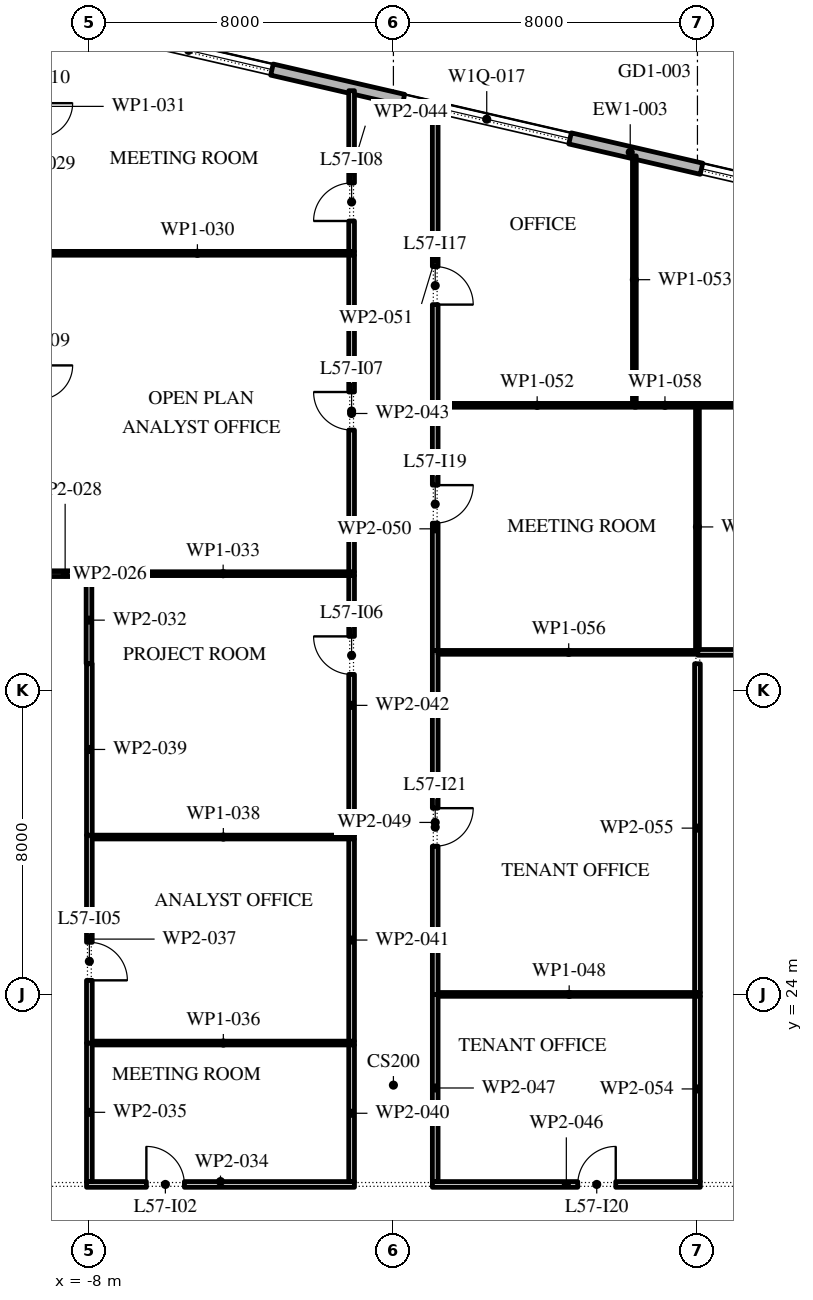
"""IFC4 building model, lengths in metres.
Left out: names, types, materials, properties, quantities, classifications, styles, units other than length and angle.
Written with IfcOpenShell. Run it as: python <this file> out.ifc"""

import sys

from ifc_helpers import new_model, si_unit, direction, frame, frame_2d, origin, place, context, subcontext, project, spatial, rectangle, extrude, element, fill, save


model = new_model("IFC4")
c1 = context("Model", 3, precision=1e-05, world=origin(), true_north=direction((0.0, 1.0)))
c2 = subcontext(c1, "Body", "Model", "MODEL_VIEW")
j1 = project(units=[si_unit("LENGTHUNIT", "METRE"), si_unit("PLANEANGLEUNIT", "RADIAN")], contexts=[c1])
p1 = place(None, origin())
s1 = spatial("IfcSite", under=j1, at=p1, CompositionType="ELEMENT")
p2 = place(p1, origin())
s2 = spatial("IfcBuilding", under=s1, at=p2, CompositionType="ELEMENT")
p3 = place(p2, frame((0.0, 0.0, 264.0)))
s3 = spatial("IfcBuildingStorey", under=s2, at=p3, CompositionType="ELEMENT", Elevation=264.0)
p4 = place(p3, frame((29.616, 40.758, 0.0), z_axis=(0.0, 0.0, 1.0), x_axis=(-0.974370532314, 0.224949029246, 0.0)))
e1 = element("IfcWall", 1, at=p4, inside=s3, PredefinedType="STANDARD", context=c2, shape_type="SweptSolid", body=[
    extrude(rectangle(XDim=48.0, YDim=0.3, at=frame_2d((24.0, 0.0))), origin(), (0.0, 0.0, 1.0), 4.0),
])
p5 = place(p4, frame((1.625, 0.0, 0.45)))
e2 = element("IfcOpeningElement", 2, at=p5, cuts=e1, PredefinedType="OPENING", context=c2, shape_type="SweptSolid", body=[
    extrude(rectangle(XDim=4.5, YDim=2.575, at=frame_2d((2.25, 1.288))), frame((0.0, 0.16, 0.0), z_axis=(0.0, -1.0, 0.0), x_axis=(1.0, 0.0, 0.0)), (0.0, 0.0, 1.0), 0.32),
])
p6 = place(p4, frame((10.575, 0.0, 0.0)))
e3 = element("IfcOpeningElement", 3, at=p6, cuts=e1, PredefinedType="OPENING", context=c2, shape_type="SweptSolid", body=[
    extrude(rectangle(XDim=2.4, YDim=3.5, at=frame_2d((1.2, 1.75))), frame((0.0, 0.16, 0.0), z_axis=(0.0, -1.0, 0.0), x_axis=(1.0, 0.0, 0.0)), (0.0, 0.0, 1.0), 0.32),
])
p7 = place(p4, frame((17.575, 0.0, 0.45)))
e4 = element("IfcOpeningElement", 4, at=p7, cuts=e1, PredefinedType="OPENING", context=c2, shape_type="SweptSolid", body=[
    extrude(rectangle(XDim=4.5, YDim=2.45, at=frame_2d((2.25, 1.225))), frame((0.0, 0.16, 0.0), z_axis=(0.0, -1.0, 0.0), x_axis=(1.0, 0.0, 0.0)), (0.0, 0.0, 1.0), 0.32),
])
p8 = place(p4, frame((25.625, 0.0, 0.45)))
e5 = element("IfcOpeningElement", 5, at=p8, cuts=e1, PredefinedType="OPENING", context=c2, shape_type="SweptSolid", body=[
    extrude(rectangle(XDim=4.5, YDim=2.45, at=frame_2d((2.25, 1.225))), frame((0.0, 0.16, 0.0), z_axis=(0.0, -1.0, 0.0), x_axis=(1.0, 0.0, 0.0)), (0.0, 0.0, 1.0), 0.32),
])
p9 = place(p4, frame((33.675, 0.0, 0.45)))
e6 = element("IfcOpeningElement", 6, at=p9, cuts=e1, PredefinedType="OPENING", context=c2, shape_type="SweptSolid", body=[
    extrude(rectangle(XDim=4.5, YDim=2.45, at=frame_2d((2.25, 1.225))), frame((0.0, 0.16, 0.0), z_axis=(0.0, -1.0, 0.0), x_axis=(1.0, 0.0, 0.0)), (0.0, 0.0, 1.0), 0.32),
])
p10 = place(p4, frame((42.775, 0.0, 0.0)))
e7 = element("IfcOpeningElement", 7, at=p10, cuts=e1, PredefinedType="OPENING", context=c2, shape_type="SweptSolid", body=[
    extrude(rectangle(XDim=2.4, YDim=3.5, at=frame_2d((1.2, 1.75))), frame((0.0, 0.16, 0.0), z_axis=(0.0, -1.0, 0.0), x_axis=(1.0, 0.0, 0.0)), (0.0, 0.0, 1.0), 0.32),
])
p11 = place(p3, frame((-9.34, 35.07, 0.0), z_axis=(0.0, 0.0, 1.0), x_axis=(1.0, 0.0, 0.0)))
e8 = element("IfcWall", 8, at=p11, inside=s3, PredefinedType="PARTITIONING", context=c2, shape_type="SweptSolid", body=[
    extrude(rectangle(XDim=1.405, YDim=0.15, at=frame_2d((0.703, 0.0))), origin(), (0.0, 0.0, 1.0), 4.0),
])
p12 = place(p3, frame((-9.29, 43.5, 0.0), z_axis=(0.0, 0.0, 1.0), x_axis=(1.0, 0.0, 0.0)))
e9 = element("IfcWall", 9, at=p12, inside=s3, PredefinedType="PARTITIONING", context=c2, shape_type="SweptSolid", body=[
    extrude(rectangle(XDim=8.265, YDim=0.1, at=frame_2d((4.133, 0.0))), origin(), (0.0, 0.0, 1.0), 4.0),
])
p13 = place(p3, frame((-8.01, 34.995, 0.0), z_axis=(0.0, 0.0, 1.0), x_axis=(0.0, -1.0, 0.0)))
e10 = element("IfcWall", 10, at=p13, inside=s3, PredefinedType="PARTITIONING", context=c2, shape_type="SweptSolid", body=[
    extrude(rectangle(XDim=2.295, YDim=0.15, at=frame_2d((1.147, 0.0))), origin(), (0.0, 0.0, 1.0), 4.0),
])
p14 = place(p3, frame((-7.935, 35.07, 0.0), z_axis=(0.0, 0.0, 1.0), x_axis=(1.0, 0.0, 0.0)))
e11 = element("IfcWall", 11, at=p14, inside=s3, PredefinedType="PARTITIONING", context=c2, shape_type="SweptSolid", body=[
    extrude(rectangle(XDim=6.91, YDim=0.1, at=frame_2d((3.455, 0.0))), origin(), (0.0, 0.0, 1.0), 4.0),
])
p15 = place(p3, frame((-8.075, 19.0, 0.0), z_axis=(0.0, 0.0, 1.0), x_axis=(1.0, 0.0, 0.0)))
e12 = element("IfcWall", 12, at=p15, inside=s3, PredefinedType="PARTITIONING", context=c2, shape_type="SweptSolid", body=[
    extrude(rectangle(XDim=7.05, YDim=0.15, at=frame_2d((3.525, 0.0))), origin(), (0.0, 0.0, 1.0), 4.0),
])
p16 = place(p15, frame((1.575, 0.0, 0.0)))
e13 = element("IfcOpeningElement", 13, at=p16, cuts=e12, PredefinedType="OPENING", context=c2, shape_type="SweptSolid", body=[
    extrude(rectangle(XDim=1.0, YDim=2.1, at=frame_2d((0.5, 1.05))), frame((0.0, 0.085, 0.0), z_axis=(0.0, -1.0, 0.0), x_axis=(1.0, 0.0, 0.0)), (0.0, 0.0, 1.0), 0.17),
])
p17 = place(p3, frame((-8.0, 22.72, 0.0), z_axis=(0.0, 0.0, 1.0), x_axis=(0.0, -1.0, 0.0)))
e14 = element("IfcWall", 14, at=p17, inside=s3, PredefinedType="PARTITIONING", context=c2, shape_type="SweptSolid", body=[
    extrude(rectangle(XDim=3.645, YDim=0.15, at=frame_2d((1.823, 0.0))), origin(), (0.0, 0.0, 1.0), 4.0),
])
p18 = place(p3, frame((-7.925, 22.72, 0.0), z_axis=(0.0, 0.0, 1.0), x_axis=(1.0, 0.0, 0.0)))
e15 = element("IfcWall", 15, at=p18, inside=s3, PredefinedType="PARTITIONING", context=c2, shape_type="SweptSolid", body=[
    extrude(rectangle(XDim=6.9, YDim=0.1, at=frame_2d((3.45, 0.0))), origin(), (0.0, 0.0, 1.0), 4.0),
])
p19 = place(p3, frame((-8.0, 28.19, 0.0), z_axis=(0.0, 0.0, 1.0), x_axis=(0.0, -1.0, 0.0)))
e16 = element("IfcWall", 16, at=p19, inside=s3, PredefinedType="PARTITIONING", context=c2, shape_type="SweptSolid", body=[
    extrude(rectangle(XDim=5.47, YDim=0.15, at=frame_2d((2.735, 0.0))), origin(), (0.0, 0.0, 1.0), 4.0),
])
p20 = place(p19, frame((2.82, 0.0, 0.0)))
e17 = element("IfcOpeningElement", 17, at=p20, cuts=e16, PredefinedType="OPENING", context=c2, shape_type="SweptSolid", body=[
    extrude(rectangle(XDim=1.0, YDim=2.1, at=frame_2d((0.5, 1.05))), frame((0.0, 0.085, 0.0), z_axis=(0.0, -1.0, 0.0), x_axis=(1.0, 0.0, 0.0)), (0.0, 0.0, 1.0), 0.17),
])
p21 = place(p3, frame((-7.925, 28.14, 0.0), z_axis=(0.0, 0.0, 1.0), x_axis=(1.0, 0.0, 0.0)))
e18 = element("IfcWall", 18, at=p21, inside=s3, PredefinedType="PARTITIONING", context=c2, shape_type="SweptSolid", body=[
    extrude(rectangle(XDim=6.9, YDim=0.1, at=frame_2d((3.45, 0.0))), origin(), (0.0, 0.0, 1.0), 4.0),
])
p22 = place(p3, frame((-8.0, 32.7, 0.0), z_axis=(0.0, 0.0, 1.0), x_axis=(0.0, -1.0, 0.0)))
e19 = element("IfcWall", 19, at=p22, inside=s3, PredefinedType="PARTITIONING", context=c2, shape_type="SweptSolid", body=[
    extrude(rectangle(XDim=4.51, YDim=0.15, at=frame_2d((2.255, 0.0))), origin(), (0.0, 0.0, 1.0), 4.0),
])
p23 = place(p3, frame((-1.1, 19.075, 0.0), z_axis=(0.0, 0.0, 1.0), x_axis=(0.0, 1.0, 0.0)))
e20 = element("IfcWall", 20, at=p23, inside=s3, PredefinedType="PARTITIONING", context=c2, shape_type="SweptSolid", body=[
    extrude(rectangle(XDim=3.595, YDim=0.15, at=frame_2d((1.797, 0.0))), origin(), (0.0, 0.0, 1.0), 4.0),
])
p24 = place(p3, frame((-1.1, 22.77, 0.0), z_axis=(0.0, 0.0, 1.0), x_axis=(0.0, 1.0, 0.0)))
e21 = element("IfcWall", 21, at=p24, inside=s3, PredefinedType="PARTITIONING", context=c2, shape_type="SweptSolid", body=[
    extrude(rectangle(XDim=5.32, YDim=0.15, at=frame_2d((2.66, 0.0))), origin(), (0.0, 0.0, 1.0), 4.0),
])
p25 = place(p3, frame((-1.1, 28.19, 0.0), z_axis=(0.0, 0.0, 1.0), x_axis=(0.0, 1.0, 0.0)))
e22 = element("IfcWall", 22, at=p25, inside=s3, PredefinedType="PARTITIONING", context=c2, shape_type="SweptSolid", body=[
    extrude(rectangle(XDim=6.83, YDim=0.15, at=frame_2d((3.415, 0.0))), origin(), (0.0, 0.0, 1.0), 4.0),
])
p26 = place(p25, frame((4.23, 0.0, 0.0)))
e23 = element("IfcOpeningElement", 23, at=p26, cuts=e22, PredefinedType="OPENING", context=c2, shape_type="SweptSolid", body=[
    extrude(rectangle(XDim=1.0, YDim=2.1, at=frame_2d((0.5, 1.05))), frame((0.0, 0.085, 0.0), z_axis=(0.0, -1.0, 0.0), x_axis=(1.0, 0.0, 0.0)), (0.0, 0.0, 1.0), 0.17),
])
p27 = place(p3, frame((-1.1, 35.12, 0.0), z_axis=(0.0, 0.0, 1.0), x_axis=(0.0, 1.0, 0.0)))
e24 = element("IfcWall", 24, at=p27, inside=s3, PredefinedType="PARTITIONING", context=c2, shape_type="SweptSolid", body=[
    extrude(rectangle(XDim=8.33, YDim=0.15, at=frame_2d((4.165, 0.0))), origin(), (0.0, 0.0, 1.0), 4.0),
])
p28 = place(p27, frame((3.73, 0.0, 0.0)))
e25 = element("IfcOpeningElement", 25, at=p28, cuts=e24, PredefinedType="OPENING", context=c2, shape_type="SweptSolid", body=[
    extrude(rectangle(XDim=1.0, YDim=2.1, at=frame_2d((0.5, 1.05))), frame((0.0, 0.085, 0.0), z_axis=(0.0, -1.0, 0.0), x_axis=(1.0, 0.0, 0.0)), (0.0, 0.0, 1.0), 0.17),
])
p29 = place(p3, frame((-1.1, 43.55, 0.0), z_axis=(0.0, 0.0, 1.0), x_axis=(0.0, 1.0, 0.0)))
e26 = element("IfcWall", 26, at=p29, inside=s3, PredefinedType="PARTITIONING", context=c2, shape_type="SweptSolid", body=[
    extrude(rectangle(XDim=4.228, YDim=0.15, at=frame_2d((2.114, 0.0))), origin(), (0.0, 0.0, 1.0), 4.0),
])
p30 = place(p29, frame((0.8, 0.0, 0.0)))
e27 = element("IfcOpeningElement", 27, at=p30, cuts=e26, PredefinedType="OPENING", context=c2, shape_type="SweptSolid", body=[
    extrude(rectangle(XDim=1.0, YDim=2.1, at=frame_2d((0.5, 1.05))), frame((0.0, 0.085, 0.0), z_axis=(0.0, -1.0, 0.0), x_axis=(1.0, 0.0, 0.0)), (0.0, 0.0, 1.0), 0.17),
])
p31 = place(p3, frame((1.025, 19.0, 0.0), z_axis=(0.0, 0.0, 1.0), x_axis=(1.0, 0.0, 0.0)))
e28 = element("IfcWall", 28, at=p31, inside=s3, PredefinedType="PARTITIONING", context=c2, shape_type="SweptSolid", body=[
    extrude(rectangle(XDim=7.05, YDim=0.15, at=frame_2d((3.525, 0.0))), origin(), (0.0, 0.0, 1.0), 4.0),
])
p32 = place(p31, frame((3.825, 0.0, 0.0)))
e29 = element("IfcOpeningElement", 29, at=p32, cuts=e28, PredefinedType="OPENING", context=c2, shape_type="SweptSolid", body=[
    extrude(rectangle(XDim=1.0, YDim=2.1, at=frame_2d((0.5, 1.05))), frame((0.0, 0.085, 0.0), z_axis=(0.0, -1.0, 0.0), x_axis=(1.0, 0.0, 0.0)), (0.0, 0.0, 1.0), 0.17),
])
p33 = place(p3, frame((1.1, 24.0, 0.0), z_axis=(0.0, 0.0, 1.0), x_axis=(0.0, -1.0, 0.0)))
e30 = element("IfcWall", 30, at=p33, inside=s3, PredefinedType="PARTITIONING", context=c2, shape_type="SweptSolid", body=[
    extrude(rectangle(XDim=4.925, YDim=0.15, at=frame_2d((2.462, 0.0))), origin(), (0.0, 0.0, 1.0), 4.0),
])
p34 = place(p3, frame((1.175, 24.0, 0.0), z_axis=(0.0, 0.0, 1.0), x_axis=(1.0, 0.0, 0.0)))
e31 = element("IfcWall", 31, at=p34, inside=s3, PredefinedType="PARTITIONING", context=c2, shape_type="SweptSolid", body=[
    extrude(rectangle(XDim=6.9, YDim=0.1, at=frame_2d((3.45, 0.0))), origin(), (0.0, 0.0, 1.0), 4.0),
])
p35 = place(p3, frame((1.1, 33.05, 0.0), z_axis=(0.0, 0.0, 1.0), x_axis=(0.0, -1.0, 0.0)))
e32 = element("IfcWall", 32, at=p35, inside=s3, PredefinedType="PARTITIONING", context=c2, shape_type="SweptSolid", body=[
    extrude(rectangle(XDim=9.05, YDim=0.15, at=frame_2d((4.525, 0.0))), origin(), (0.0, 0.0, 1.0), 4.0),
])
p36 = place(p35, frame((4.15, 0.0, 0.0)))
e33 = element("IfcOpeningElement", 33, at=p36, cuts=e32, PredefinedType="OPENING", context=c2, shape_type="SweptSolid", body=[
    extrude(rectangle(XDim=1.0, YDim=2.1, at=frame_2d((0.5, 1.05))), frame((0.0, 0.085, 0.0), z_axis=(0.0, -1.0, 0.0), x_axis=(1.0, 0.0, 0.0)), (0.0, 0.0, 1.0), 0.17),
])
p37 = place(p3, frame((1.1, 39.45, 0.0), z_axis=(0.0, 0.0, 1.0), x_axis=(0.0, -1.0, 0.0)))
e34 = element("IfcWall", 34, at=p37, inside=s3, PredefinedType="PARTITIONING", context=c2, shape_type="SweptSolid", body=[
    extrude(rectangle(XDim=6.4, YDim=0.15, at=frame_2d((3.2, 0.0))), origin(), (0.0, 0.0, 1.0), 4.0),
])
p38 = place(p37, frame((2.05, 0.0, 0.0)))
e35 = element("IfcOpeningElement", 35, at=p38, cuts=e34, PredefinedType="OPENING", context=c2, shape_type="SweptSolid", body=[
    extrude(rectangle(XDim=1.0, YDim=2.1, at=frame_2d((0.5, 1.05))), frame((0.0, 0.085, 0.0), z_axis=(0.0, -1.0, 0.0), x_axis=(1.0, 0.0, 0.0)), (0.0, 0.0, 1.0), 0.17),
])
p39 = place(p3, frame((1.1, 47.27, 0.0), z_axis=(0.0, 0.0, 1.0), x_axis=(0.0, -1.0, 0.0)))
e36 = element("IfcWall", 36, at=p39, inside=s3, PredefinedType="PARTITIONING", context=c2, shape_type="SweptSolid", body=[
    extrude(rectangle(XDim=7.82, YDim=0.15, at=frame_2d((3.91, 0.0))), origin(), (0.0, 0.0, 1.0), 4.0),
])
p40 = place(p39, frame((4.12, 0.0, 0.0)))
e37 = element("IfcOpeningElement", 37, at=p40, cuts=e36, PredefinedType="OPENING", context=c2, shape_type="SweptSolid", body=[
    extrude(rectangle(XDim=1.0, YDim=2.1, at=frame_2d((0.5, 1.05))), frame((0.0, 0.085, 0.0), z_axis=(0.0, -1.0, 0.0), x_axis=(1.0, 0.0, 0.0)), (0.0, 0.0, 1.0), 0.17),
])
p41 = place(p3, frame((6.39, 39.5, 0.0), z_axis=(0.0, 0.0, 1.0), x_axis=(-1.0, 0.0, 0.0)))
e38 = element("IfcWall", 38, at=p41, inside=s3, PredefinedType="PARTITIONING", context=c2, shape_type="SweptSolid", body=[
    extrude(rectangle(XDim=5.215, YDim=0.1, at=frame_2d((2.607, 0.0))), origin(), (0.0, 0.0, 1.0), 4.0),
])
p42 = place(p3, frame((6.34, 39.55, 0.0), z_axis=(0.0, 0.0, 1.0), x_axis=(0.0, 1.0, 0.0)))
e39 = element("IfcWall", 39, at=p42, inside=s3, PredefinedType="PARTITIONING", context=c2, shape_type="SweptSolid", body=[
    extrude(rectangle(XDim=6.511, YDim=0.1, at=frame_2d((3.255, 0.0))), origin(), (0.0, 0.0, 1.0), 4.0),
])
p43 = place(p3, frame((8.0, 19.075, 0.0), z_axis=(0.0, 0.0, 1.0), x_axis=(0.0, 1.0, 0.0)))
e40 = element("IfcWall", 40, at=p43, inside=s3, PredefinedType="PARTITIONING", context=c2, shape_type="SweptSolid", body=[
    extrude(rectangle(XDim=4.875, YDim=0.15, at=frame_2d((2.438, 0.0))), origin(), (0.0, 0.0, 1.0), 4.0),
])
p44 = place(p3, frame((8.0, 24.05, 0.0), z_axis=(0.0, 0.0, 1.0), x_axis=(0.0, 1.0, 0.0)))
e41 = element("IfcWall", 41, at=p44, inside=s3, PredefinedType="PARTITIONING", context=c2, shape_type="SweptSolid", body=[
    extrude(rectangle(XDim=8.65, YDim=0.15, at=frame_2d((4.325, 0.0))), origin(), (0.0, 0.0, 1.0), 4.0),
])
p45 = place(p3, frame((8.05, 33.0, 0.0), z_axis=(0.0, 0.0, 1.0), x_axis=(-1.0, 0.0, 0.0)))
e42 = element("IfcWall", 42, at=p45, inside=s3, PredefinedType="PARTITIONING", context=c2, shape_type="SweptSolid", body=[
    extrude(rectangle(XDim=6.875, YDim=0.1, at=frame_2d((3.438, 0.0))), origin(), (0.0, 0.0, 1.0), 4.0),
])
p46 = place(p3, frame((8.0, 33.05, 0.0), z_axis=(0.0, 0.0, 1.0), x_axis=(0.0, 1.0, 0.0)))
e43 = element("IfcWall", 43, at=p46, inside=s3, PredefinedType="PARTITIONING", context=c2, shape_type="SweptSolid", body=[
    extrude(rectangle(XDim=6.5, YDim=0.1, at=frame_2d((3.25, 0.0))), origin(), (0.0, 0.0, 1.0), 4.0),
])
p47 = place(p3, frame((7.95, 39.5, 0.0), z_axis=(0.0, 0.0, 1.0), x_axis=(-1.0, 0.0, 0.0)))
e44 = element("IfcWall", 44, at=p47, inside=s3, PredefinedType="PARTITIONING", context=c2, shape_type="SweptSolid", body=[
    extrude(rectangle(XDim=1.61, YDim=0.1, at=frame_2d((0.805, 0.0))), origin(), (0.0, 0.0, 1.0), 4.0),
])
p48 = place(p3, frame((8.01, 33.0, 0.0), z_axis=(0.0, 0.0, 1.0), x_axis=(1.0, 0.0, 0.0)))
e45 = element("IfcWall", 45, at=p48, inside=s3, PredefinedType="PARTITIONING", context=c2, shape_type="SweptSolid", body=[
    extrude(rectangle(XDim=6.255, YDim=0.15, at=frame_2d((3.127, 0.0))), origin(), (0.0, 0.0, 1.0), 4.0),
])
p49 = place(p48, frame((1.28, 0.0, 0.0)))
e46 = element("IfcOpeningElement", 46, at=p49, cuts=e45, PredefinedType="OPENING", context=c2, shape_type="SweptSolid", body=[
    extrude(rectangle(XDim=1.0, YDim=2.1, at=frame_2d((0.5, 1.05))), frame((0.0, 0.085, 0.0), z_axis=(0.0, -1.0, 0.0), x_axis=(1.0, 0.0, 0.0)), (0.0, 0.0, 1.0), 0.17),
])
p50 = place(p3, frame((22.08, 39.5, 0.0), z_axis=(0.0, 0.0, 1.0), x_axis=(-1.0, 0.0, 0.0)))
e47 = element("IfcWall", 47, at=p50, inside=s3, PredefinedType="PARTITIONING", context=c2, shape_type="SweptSolid", body=[
    extrude(rectangle(XDim=14.03, YDim=0.1, at=frame_2d((7.015, 0.0))), origin(), (0.0, 0.0, 1.0), 4.0),
])
p51 = place(p50, frame((8.0, 0.0, 0.0)))
e48 = element("IfcOpeningElement", 48, at=p51, cuts=e47, PredefinedType="OPENING", context=c2, shape_type="SweptSolid", body=[
    extrude(rectangle(XDim=0.9, YDim=2.1, at=frame_2d((0.45, 1.05))), frame((0.0, 0.06, 0.0), z_axis=(0.0, -1.0, 0.0), x_axis=(1.0, 0.0, 0.0)), (0.0, 0.0, 1.0), 0.12),
])
p52 = place(p7, origin())
e49 = element("IfcWindow", 49, at=p52, inside=s3, PartitioningType="DOUBLE_PANEL_VERTICAL", PredefinedType="WINDOW", context=c2, shape_type="SweptSolid", body=[
    extrude(rectangle(XDim=4.5, YDim=2.45, at=frame_2d((2.25, 1.225))), frame((0.0, 0.03, 0.0), z_axis=(0.0, -1.0, 0.0), x_axis=(1.0, 0.0, 0.0)), (0.0, 0.0, 1.0), 0.06),
])
fill(e4, e49)
p53 = place(p8, origin())
e50 = element("IfcWindow", 50, at=p53, inside=s3, PartitioningType="DOUBLE_PANEL_VERTICAL", PredefinedType="WINDOW", context=c2, shape_type="SweptSolid", body=[
    extrude(rectangle(XDim=4.5, YDim=2.45, at=frame_2d((2.25, 1.225))), frame((0.0, 0.03, 0.0), z_axis=(0.0, -1.0, 0.0), x_axis=(1.0, 0.0, 0.0)), (0.0, 0.0, 1.0), 0.06),
])
fill(e5, e50)
p54 = place(p9, origin())
e51 = element("IfcWindow", 51, at=p54, inside=s3, PartitioningType="DOUBLE_PANEL_VERTICAL", PredefinedType="WINDOW", context=c2, shape_type="SweptSolid", body=[
    extrude(rectangle(XDim=4.5, YDim=2.45, at=frame_2d((2.25, 1.225))), frame((0.0, 0.03, 0.0), z_axis=(0.0, -1.0, 0.0), x_axis=(1.0, 0.0, 0.0)), (0.0, 0.0, 1.0), 0.06),
])
fill(e6, e51)
p55 = place(p16, origin())
e52 = element("IfcDoor", 52, at=p55, inside=s3, OperationType="SINGLE_SWING_RIGHT", PredefinedType="DOOR", context=c2, shape_type="SweptSolid", body=[
    extrude(rectangle(XDim=1.0, YDim=2.1, at=frame_2d((0.5, 1.05))), frame((0.0, 0.025, 0.0), z_axis=(0.0, -1.0, 0.0), x_axis=(1.0, 0.0, 0.0)), (0.0, 0.0, 1.0), 0.05),
])
fill(e13, e52)
p56 = place(p20, origin())
e53 = element("IfcDoor", 53, at=p56, inside=s3, OperationType="SINGLE_SWING_LEFT", PredefinedType="DOOR", context=c2, shape_type="SweptSolid", body=[
    extrude(rectangle(XDim=1.0, YDim=2.1, at=frame_2d((0.5, 1.05))), frame((0.0, 0.025, 0.0), z_axis=(0.0, -1.0, 0.0), x_axis=(1.0, 0.0, 0.0)), (0.0, 0.0, 1.0), 0.05),
])
fill(e17, e53)
p57 = place(p26, origin())
e54 = element("IfcDoor", 54, at=p57, inside=s3, OperationType="SINGLE_SWING_LEFT", PredefinedType="DOOR", context=c2, shape_type="SweptSolid", body=[
    extrude(rectangle(XDim=1.0, YDim=2.1, at=frame_2d((0.5, 1.05))), frame((0.0, 0.025, 0.0), z_axis=(0.0, -1.0, 0.0), x_axis=(1.0, 0.0, 0.0)), (0.0, 0.0, 1.0), 0.05),
])
fill(e23, e54)
p58 = place(p28, origin())
e55 = element("IfcDoor", 55, at=p58, inside=s3, OperationType="SINGLE_SWING_LEFT", PredefinedType="DOOR", context=c2, shape_type="SweptSolid", body=[
    extrude(rectangle(XDim=1.0, YDim=2.1, at=frame_2d((0.5, 1.05))), frame((0.0, 0.025, 0.0), z_axis=(0.0, -1.0, 0.0), x_axis=(1.0, 0.0, 0.0)), (0.0, 0.0, 1.0), 0.05),
])
fill(e25, e55)
p59 = place(p30, origin())
e56 = element("IfcDoor", 56, at=p59, inside=s3, OperationType="SINGLE_SWING_RIGHT", PredefinedType="DOOR", context=c2, shape_type="SweptSolid", body=[
    extrude(rectangle(XDim=1.0, YDim=2.1, at=frame_2d((0.5, 1.05))), frame((0.0, 0.025, 0.0), z_axis=(0.0, -1.0, 0.0), x_axis=(1.0, 0.0, 0.0)), (0.0, 0.0, 1.0), 0.05),
])
fill(e27, e56)
p60 = place(p40, origin())
e57 = element("IfcDoor", 57, at=p60, inside=s3, OperationType="SINGLE_SWING_LEFT", PredefinedType="DOOR", context=c2, shape_type="SweptSolid", body=[
    extrude(rectangle(XDim=1.0, YDim=2.1, at=frame_2d((0.5, 1.05))), frame((0.0, 0.025, 0.0), z_axis=(0.0, -1.0, 0.0), x_axis=(1.0, 0.0, 0.0)), (0.0, 0.0, 1.0), 0.05),
])
fill(e37, e57)
p61 = place(p38, origin())
e58 = element("IfcDoor", 58, at=p61, inside=s3, OperationType="SINGLE_SWING_RIGHT", PredefinedType="DOOR", context=c2, shape_type="SweptSolid", body=[
    extrude(rectangle(XDim=1.0, YDim=2.1, at=frame_2d((0.5, 1.05))), frame((0.0, 0.025, 0.0), z_axis=(0.0, -1.0, 0.0), x_axis=(1.0, 0.0, 0.0)), (0.0, 0.0, 1.0), 0.05),
])
fill(e35, e58)
p62 = place(p32, origin())
e59 = element("IfcDoor", 59, at=p62, inside=s3, OperationType="SINGLE_SWING_LEFT", PredefinedType="DOOR", context=c2, shape_type="SweptSolid", body=[
    extrude(rectangle(XDim=1.0, YDim=2.1, at=frame_2d((0.5, 1.05))), frame((0.0, 0.025, 0.0), z_axis=(0.0, -1.0, 0.0), x_axis=(1.0, 0.0, 0.0)), (0.0, 0.0, 1.0), 0.05),
])
fill(e29, e59)
p63 = place(p36, origin())
e60 = element("IfcDoor", 60, at=p63, inside=s3, OperationType="SINGLE_SWING_RIGHT", PredefinedType="DOOR", context=c2, shape_type="SweptSolid", body=[
    extrude(rectangle(XDim=1.0, YDim=2.1, at=frame_2d((0.5, 1.05))), frame((0.0, 0.025, 0.0), z_axis=(0.0, -1.0, 0.0), x_axis=(1.0, 0.0, 0.0)), (0.0, 0.0, 1.0), 0.05),
])
fill(e33, e60)
save(model, sys.argv[1])
